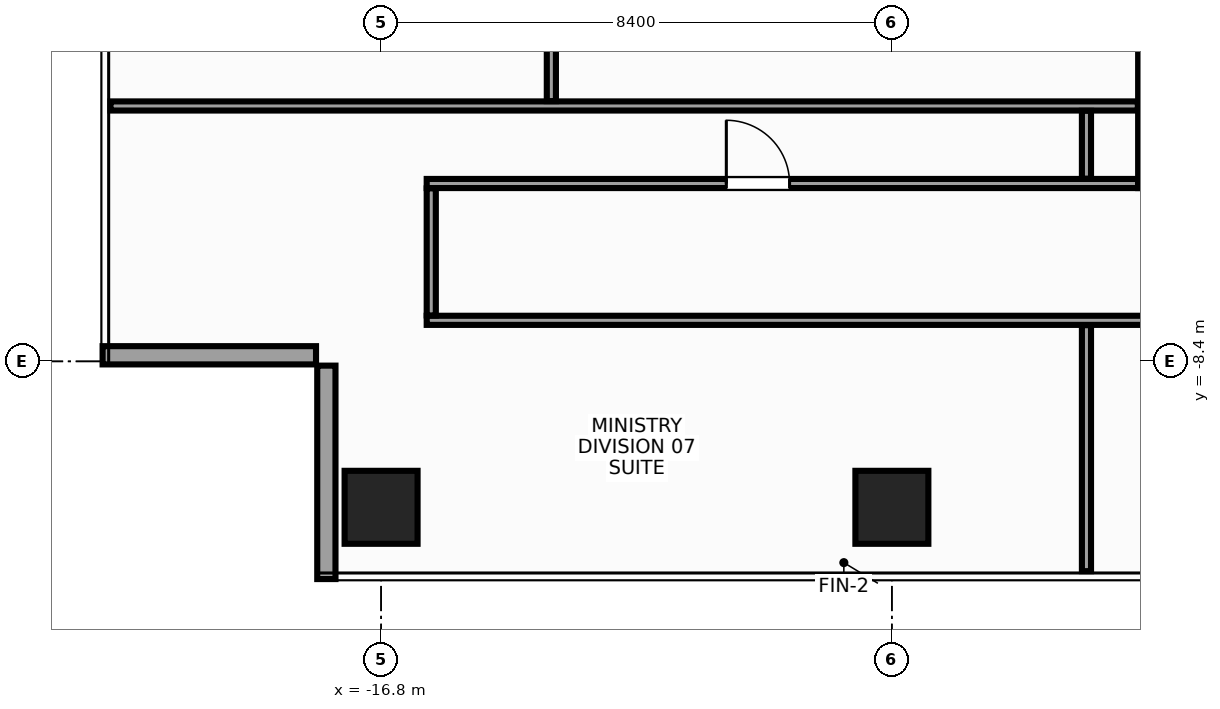
"""IFC4 building model, lengths in metres.
Left out: names, types, materials, properties, quantities, classifications, styles, units other than length and angle.
Written with IfcOpenShell. Run it as: python <this file> out.ifc"""

import sys

from ifc_helpers import new_model, si_unit, direction, frame, frame_2d, origin, origin_2d, place, context, subcontext, project, spatial, rectangle, extrude, source, transform, mapped, element, fill, save


model = new_model("IFC4")
c1 = context("Model", 3, precision=1e-05, world=origin(), true_north=direction((0.0, 1.0)))
c2 = subcontext(c1, "Body", "Model", "MODEL_VIEW")
j1 = project(units=[si_unit("LENGTHUNIT", "METRE"), si_unit("PLANEANGLEUNIT", "RADIAN")], contexts=[c1])
p1 = place(None, origin())
s1 = spatial("IfcSite", under=j1, at=p1, CompositionType="ELEMENT")
p2 = place(p1, origin())
s2 = spatial("IfcBuilding", under=s1, at=p2, CompositionType="ELEMENT")
p3 = place(p2, frame((0.0, 0.0, 279.2)))
s3 = spatial("IfcBuildingStorey", under=s2, at=p3, CompositionType="ELEMENT", Elevation=279.2)
m1 = source(origin(), c2, "Body", "SweptSolid", [
    extrude(rectangle(XDim=1.2, YDim=1.2, at=origin_2d()), origin(), (0.0, 0.0, 1.0), 3.6),
])
for number, where, z_axis, x_axis in (
    (1, (-16.8, -10.8, 0.0), (0.0, 0.0, 1.0), (1.0, 0.0, 0.0)),
    (2, (-8.4, -10.8, 0.0), (0.0, 0.0, 1.0), (1.0, 0.0, 0.0)),
):
    element("IfcColumn", number, at=place(p3, frame(where, z_axis=z_axis, x_axis=x_axis)), inside=s3, PredefinedType="COLUMN", context=c2, shape_type="MappedRepresentation", body=[
        mapped(m1, transform((0.0, 0.0, 0.0), x_axis=(1.0, 0.0, 0.0), y_axis=(0.0, 1.0, 0.0), z_axis=(0.0, 0.0, 1.0), scale=1.0)),
    ])
m2 = source(origin(), c2, "Body", "SweptSolid", [
    extrude(rectangle(XDim=3.51, YDim=0.3, at=frame_2d((1.755, 0.0))), origin(), (0.0, 0.0, 1.0), 2.75),
])
p4 = place(p3, frame((-21.38, -8.3, 0.0), z_axis=(0.0, 0.0, 1.0), x_axis=(1.0, 0.0, 0.0)))
e3 = element("IfcWall", 3, at=p4, inside=s3, PredefinedType="STANDARD", context=c2, shape_type="MappedRepresentation", body=[
    mapped(m2, transform((0.0, 0.0, 0.0), x_axis=(1.0, 0.0, 0.0), y_axis=(0.0, 1.0, 0.0), z_axis=(0.0, 0.0, 1.0), scale=1.0)),
])
m3 = source(origin(), c2, "Body", "SweptSolid", [
    extrude(rectangle(XDim=3.51, YDim=0.3, at=frame_2d((1.755, 0.0))), origin(), (0.0, 0.0, 1.0), 2.75),
])
p5 = place(p3, frame((-17.7, -8.47, 0.0), z_axis=(0.0, 0.0, 1.0), x_axis=(0.0, -1.0, 0.0)))
e4 = element("IfcWall", 4, at=p5, inside=s3, PredefinedType="STANDARD", context=c2, shape_type="MappedRepresentation", body=[
    mapped(m3, transform((0.0, 0.0, 0.0), x_axis=(1.0, 0.0, 0.0), y_axis=(0.0, 1.0, 0.0), z_axis=(0.0, 0.0, 1.0), scale=1.0)),
])
m4 = source(origin(), c2, "Body", "SweptSolid", [
    extrude(rectangle(XDim=11.7, YDim=0.15, at=frame_2d((5.85, 0.0))), origin(), (0.0, 0.0, 1.0), 2.755),
])
p6 = place(p3, frame((-16.05, -5.475, 0.0), z_axis=(0.0, 0.0, 1.0), x_axis=(1.0, 0.0, 0.0)))
e5 = element("IfcWall", 5, at=p6, inside=s3, PredefinedType="PARTITIONING", context=c2, shape_type="MappedRepresentation", body=[
    mapped(m4, transform((0.0, 0.0, 0.0), x_axis=(1.0, 0.0, 0.0), y_axis=(0.0, 1.0, 0.0), z_axis=(0.0, 0.0, 1.0), scale=1.0)),
])
p7 = place(p6, frame((4.927, 0.0, 0.0)))
e6 = element("IfcOpeningElement", 6, at=p7, cuts=e5, PredefinedType="OPENING", context=c2, shape_type="SweptSolid", body=[
    extrude(rectangle(XDim=1.04, YDim=2.2, at=frame_2d((0.52, 1.1))), frame((0.0, 0.087, 0.0), z_axis=(0.0, -1.0, 0.0), x_axis=(1.0, 0.0, 0.0)), (0.0, 0.0, 1.0), 0.174),
])
m5 = source(origin(), c2, "Body", "SweptSolid", [
    extrude(rectangle(XDim=32.1, YDim=0.15, at=frame_2d((16.05, 0.0))), origin(), (0.0, 0.0, 1.0), 2.755),
])
p8 = place(p3, frame((-16.05, -7.725, 0.0), z_axis=(0.0, 0.0, 1.0), x_axis=(1.0, 0.0, 0.0)))
e7 = element("IfcWall", 7, at=p8, inside=s3, PredefinedType="PARTITIONING", context=c2, shape_type="MappedRepresentation", body=[
    mapped(m5, transform((0.0, 0.0, 0.0), x_axis=(1.0, 0.0, 0.0), y_axis=(0.0, 1.0, 0.0), z_axis=(0.0, 0.0, 1.0), scale=1.0)),
])
p9 = place(p8, frame((18.83, 0.0, 0.0)))
e8 = element("IfcOpeningElement", 8, at=p9, cuts=e7, PredefinedType="OPENING", context=c2, shape_type="SweptSolid", body=[
    extrude(rectangle(XDim=1.04, YDim=2.2, at=frame_2d((0.52, 1.1))), frame((0.0, 0.087, 0.0), z_axis=(0.0, -1.0, 0.0), x_axis=(1.0, 0.0, 0.0)), (0.0, 0.0, 1.0), 0.174),
])
m6 = source(origin(), c2, "Body", "SweptSolid", [
    extrude(rectangle(XDim=13.35, YDim=0.15, at=frame_2d((6.675, 0.0))), origin(), (0.0, 0.0, 1.0), 2.655),
])
p10 = place(p3, frame((-4.275, -5.55, 0.0), z_axis=(0.0, 0.0, 1.0), x_axis=(0.0, 1.0, 0.0)))
e9 = element("IfcWall", 9, at=p10, inside=s3, PredefinedType="PARTITIONING", context=c2, shape_type="MappedRepresentation", body=[
    mapped(m6, transform((0.0, 0.0, 0.0), x_axis=(1.0, 0.0, 0.0), y_axis=(0.0, 1.0, 0.0), z_axis=(0.0, 0.0, 1.0), scale=1.0)),
])
m7 = source(origin(), c2, "Body", "SweptSolid", [
    extrude(rectangle(XDim=2.09, YDim=0.15, at=frame_2d((1.045, 0.0))), origin(), (0.0, 0.0, 1.0), 3.37),
])
p11 = place(p3, frame((-15.975, -7.645, 0.0), z_axis=(0.0, 0.0, 1.0), x_axis=(0.0, 1.0, 0.0)))
e10 = element("IfcWall", 10, at=p11, inside=s3, PredefinedType="PARTITIONING", context=c2, shape_type="MappedRepresentation", body=[
    mapped(m7, transform((0.0, 0.0, 0.0), x_axis=(1.0, 0.0, 0.0), y_axis=(0.0, 1.0, 0.0), z_axis=(0.0, 0.0, 1.0), scale=1.0)),
])
m8 = source(origin(), c2, "Body", "SweptSolid", [
    extrude(rectangle(XDim=16.895, YDim=0.15, at=frame_2d((8.448, 0.0))), origin(), (0.0, 0.0, 1.0), 2.755),
])
p12 = place(p3, frame((-21.25, -4.2, 0.0), z_axis=(0.0, 0.0, 1.0), x_axis=(1.0, 0.0, 0.0)))
e11 = element("IfcWall", 11, at=p12, inside=s3, PredefinedType="PARTITIONING", context=c2, shape_type="MappedRepresentation", body=[
    mapped(m8, transform((0.0, 0.0, 0.0), x_axis=(1.0, 0.0, 0.0), y_axis=(0.0, 1.0, 0.0), z_axis=(0.0, 0.0, 1.0), scale=1.0)),
])
m9 = source(origin(), c2, "Body", "SweptSolid", [
    extrude(rectangle(XDim=11.765, YDim=0.15, at=frame_2d((5.883, 0.0))), origin(), (0.0, 0.0, 1.0), 2.655),
])
p13 = place(p3, frame((-14.0, -4.12, 0.0), z_axis=(0.0, 0.0, 1.0), x_axis=(0.0, 1.0, 0.0)))
e12 = element("IfcWall", 12, at=p13, inside=s3, PredefinedType="PARTITIONING", context=c2, shape_type="MappedRepresentation", body=[
    mapped(m9, transform((0.0, 0.0, 0.0), x_axis=(1.0, 0.0, 0.0), y_axis=(0.0, 1.0, 0.0), z_axis=(0.0, 0.0, 1.0), scale=1.0)),
])
m10 = source(origin(), c2, "Body", "SweptSolid", [
    extrude(rectangle(XDim=4.045, YDim=0.15, at=frame_2d((2.022, 0.0))), origin(), (0.0, 0.0, 1.0), 2.905),
])
p14 = place(p3, frame((-5.2, -11.85, 0.0), z_axis=(0.0, 0.0, 1.0), x_axis=(0.0, 1.0, 0.0)))
e13 = element("IfcWall", 13, at=p14, inside=s3, PredefinedType="PARTITIONING", context=c2, shape_type="MappedRepresentation", body=[
    mapped(m10, transform((0.0, 0.0, 0.0), x_axis=(1.0, 0.0, 0.0), y_axis=(0.0, 1.0, 0.0), z_axis=(0.0, 0.0, 1.0), scale=1.0)),
])
m11 = source(origin(), c2, "Body", "SweptSolid", [
    extrude(rectangle(XDim=1.115, YDim=0.15, at=frame_2d((0.558, 0.0))), origin(), (0.0, 0.0, 1.0), 3.37),
])
p15 = place(p3, frame((-5.2, -5.395, 0.0), z_axis=(0.0, 0.0, 1.0), x_axis=(0.0, 1.0, 0.0)))
e14 = element("IfcWall", 14, at=p15, inside=s3, PredefinedType="PARTITIONING", context=c2, shape_type="MappedRepresentation", body=[
    mapped(m11, transform((0.0, 0.0, 0.0), x_axis=(1.0, 0.0, 0.0), y_axis=(0.0, 1.0, 0.0), z_axis=(0.0, 0.0, 1.0), scale=1.0)),
])
m12 = source(origin(), c2, "Body", "SweptSolid", [
    extrude(rectangle(XDim=1.04, YDim=2.2, at=frame_2d((0.52, 1.1))), frame((0.0, 0.025, 0.0), z_axis=(0.0, -1.0, 0.0), x_axis=(1.0, 0.0, 0.0)), (0.0, 0.0, 1.0), 0.05),
])
p16 = place(p7, origin())
e15 = element("IfcDoor", 15, at=p16, inside=s3, OperationType="SINGLE_SWING_LEFT", PredefinedType="DOOR", context=c2, shape_type="MappedRepresentation", body=[
    mapped(m12, transform((0.0, 0.0, 0.0), x_axis=(1.0, 0.0, 0.0), y_axis=(0.0, 1.0, 0.0), z_axis=(0.0, 0.0, 1.0), scale=1.0)),
])
fill(e6, e15)
save(model, sys.argv[1])
